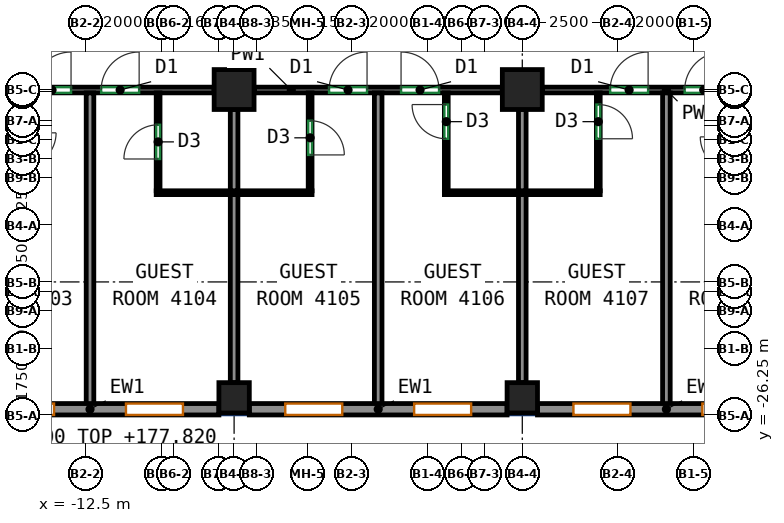
"""IFC4 building model, lengths in metres.
Left out: names, types, materials, properties, quantities, classifications, styles, units other than length and angle.
Written with IfcOpenShell. Run it as: python <this file> out.ifc"""

import sys

from ifc_helpers import new_model, si_unit, direction, frame, frame_2d, origin, origin_2d, place, context, subcontext, project, spatial, rectangle, extrude, source, transform, mapped, element, fill, save


model = new_model("IFC4")
c1 = context("Model", 3, precision=1e-05, world=origin(), true_north=direction((0.0, 1.0)))
c2 = subcontext(c1, "Body", "Model", "MODEL_VIEW")
j1 = project(units=[si_unit("LENGTHUNIT", "METRE"), si_unit("PLANEANGLEUNIT", "RADIAN")], contexts=[c1])
p1 = place(None, origin())
s1 = spatial("IfcSite", under=j1, at=p1, CompositionType="ELEMENT")
p2 = place(p1, origin())
s2 = spatial("IfcBuilding", under=s1, at=p2, CompositionType="ELEMENT")
p3 = place(p2, frame((0.0, 0.0, 175.3)))
s3 = spatial("IfcBuildingStorey", under=s2, at=p3, CompositionType="ELEMENT", Elevation=175.3)
m1 = source(origin(), c2, "Body", "SweptSolid", [
    extrude(rectangle(XDim=0.8, YDim=0.8, at=origin_2d()), origin(), (0.0, 0.0, 1.0), 3.12),
])
p4 = place(p3, frame((-8.583, -25.8, 0.0), z_axis=(0.0, 0.0, 1.0), x_axis=(1.0, 0.0, 0.0)))
e1 = element("IfcColumn", 1, at=p4, inside=s3, PredefinedType="COLUMN", context=c2, shape_type="MappedRepresentation", body=[
    mapped(m1, transform((0.0, 0.0, 0.0))),
])
m2 = source(origin(), c2, "Body", "SweptSolid", [
    extrude(rectangle(XDim=1.05, YDim=1.05, at=origin_2d()), origin(), (0.0, 0.0, 1.0), 3.12),
])
p5 = place(p3, frame((-8.583, -17.688, 0.0), z_axis=(0.0, 0.0, 1.0), x_axis=(1.0, 0.0, 0.0)))
e2 = element("IfcColumn", 2, at=p5, inside=s3, PredefinedType="COLUMN", context=c2, shape_type="MappedRepresentation", body=[
    mapped(m2, transform((0.0, 0.0, 0.0))),
])
p6 = place(p3, frame((-1.0, -25.8, 0.0), z_axis=(0.0, 0.0, 1.0), x_axis=(1.0, 0.0, 0.0)))
e3 = element("IfcColumn", 3, at=p6, inside=s3, PredefinedType="COLUMN", context=c2, shape_type="MappedRepresentation", body=[
    mapped(m1, transform((0.0, 0.0, 0.0))),
])
p7 = place(p3, frame((-1.0, -17.688, 0.0), z_axis=(0.0, 0.0, 1.0), x_axis=(1.0, 0.0, 0.0)))
e4 = element("IfcColumn", 4, at=p7, inside=s3, PredefinedType="COLUMN", context=c2, shape_type="MappedRepresentation", body=[
    mapped(m2, transform((0.0, 0.0, 0.0))),
])
m3 = source(origin(), c2, "Body", "SweptSolid", [
    extrude(rectangle(XDim=6.783, YDim=0.3, at=frame_2d((3.392, 0.0))), origin(), (0.0, 0.0, 1.0), 3.12),
])
p8 = place(p3, frame((-15.767, -26.1, 0.0), z_axis=(0.0, 0.0, 1.0), x_axis=(1.0, 0.0, 0.0)))
e5 = element("IfcWall", 5, at=p8, inside=s3, PredefinedType="SOLIDWALL", context=c2, shape_type="MappedRepresentation", body=[
    mapped(m3, transform((0.0, 0.0, 0.0))),
])
p9 = place(p8, frame((0.946, 0.0, 0.85)))
e6 = element("IfcOpeningElement", 6, at=p9, cuts=e5, PredefinedType="OPENING", context=c2, shape_type="SweptSolid", body=[
    extrude(rectangle(XDim=1.5, YDim=1.95, at=frame_2d((0.75, 0.975))), frame((0.0, 0.16, 0.0), z_axis=(0.0, -1.0, 0.0), x_axis=(1.0, 0.0, 0.0)), (0.0, 0.0, 1.0), 0.32),
])
p10 = place(p8, frame((4.338, 0.0, 0.85)))
e7 = element("IfcOpeningElement", 7, at=p10, cuts=e5, PredefinedType="OPENING", context=c2, shape_type="SweptSolid", body=[
    extrude(rectangle(XDim=1.5, YDim=1.95, at=frame_2d((0.75, 0.975))), frame((0.0, 0.16, 0.0), z_axis=(0.0, -1.0, 0.0), x_axis=(1.0, 0.0, 0.0)), (0.0, 0.0, 1.0), 0.32),
])
m4 = source(origin(), c2, "Body", "SweptSolid", [
    extrude(rectangle(XDim=6.783, YDim=0.3, at=frame_2d((3.392, 0.0))), origin(), (0.0, 0.0, 1.0), 3.12),
])
p11 = place(p3, frame((-8.183, -26.1, 0.0), z_axis=(0.0, 0.0, 1.0), x_axis=(1.0, 0.0, 0.0)))
e8 = element("IfcWall", 8, at=p11, inside=s3, PredefinedType="SOLIDWALL", context=c2, shape_type="MappedRepresentation", body=[
    mapped(m4, transform((0.0, 0.0, 0.0))),
])
p12 = place(p11, frame((0.946, 0.0, 0.85)))
e9 = element("IfcOpeningElement", 9, at=p12, cuts=e8, PredefinedType="OPENING", context=c2, shape_type="SweptSolid", body=[
    extrude(rectangle(XDim=1.5, YDim=1.95, at=frame_2d((0.75, 0.975))), frame((0.0, 0.16, 0.0), z_axis=(0.0, -1.0, 0.0), x_axis=(1.0, 0.0, 0.0)), (0.0, 0.0, 1.0), 0.32),
])
p13 = place(p11, frame((4.337, 0.0, 0.85)))
e10 = element("IfcOpeningElement", 10, at=p13, cuts=e8, PredefinedType="OPENING", context=c2, shape_type="SweptSolid", body=[
    extrude(rectangle(XDim=1.5, YDim=1.95, at=frame_2d((0.75, 0.975))), frame((0.0, 0.16, 0.0), z_axis=(0.0, -1.0, 0.0), x_axis=(1.0, 0.0, 0.0)), (0.0, 0.0, 1.0), 0.32),
])
p14 = place(p3, frame((-0.6, -26.1, 0.0), z_axis=(0.0, 0.0, 1.0), x_axis=(1.0, 0.0, 0.0)))
e11 = element("IfcWall", 11, at=p14, inside=s3, PredefinedType="SOLIDWALL", context=c2, shape_type="MappedRepresentation", body=[
    mapped(m4, transform((0.0, 0.0, 0.0))),
])
p15 = place(p14, frame((0.946, 0.0, 0.85)))
e12 = element("IfcOpeningElement", 12, at=p15, cuts=e11, PredefinedType="OPENING", context=c2, shape_type="SweptSolid", body=[
    extrude(rectangle(XDim=1.5, YDim=1.95, at=frame_2d((0.75, 0.975))), frame((0.0, 0.16, 0.0), z_axis=(0.0, -1.0, 0.0), x_axis=(1.0, 0.0, 0.0)), (0.0, 0.0, 1.0), 0.32),
])
p16 = place(p14, frame((4.337, 0.0, 0.85)))
e13 = element("IfcOpeningElement", 13, at=p16, cuts=e11, PredefinedType="OPENING", context=c2, shape_type="SweptSolid", body=[
    extrude(rectangle(XDim=1.5, YDim=1.95, at=frame_2d((0.75, 0.975))), frame((0.0, 0.16, 0.0), z_axis=(0.0, -1.0, 0.0), x_axis=(1.0, 0.0, 0.0)), (0.0, 0.0, 1.0), 0.32),
])
p17 = place(p3, frame((-15.642, -17.7, 0.0), z_axis=(0.0, 0.0, 1.0), x_axis=(1.0, 0.0, 0.0)))
e14 = element("IfcWall", 14, at=p17, inside=s3, PredefinedType="PARTITIONING", context=c2, shape_type="SweptSolid", body=[
    extrude(rectangle(XDim=6.534, YDim=0.15, at=frame_2d((3.267, 0.0))), origin(), (0.0, 0.0, 1.0), 3.12),
])
p18 = place(p17, frame((1.768, 0.0, 0.0)))
e15 = element("IfcOpeningElement", 15, at=p18, cuts=e14, PredefinedType="OPENING", context=c2, shape_type="SweptSolid", body=[
    extrude(rectangle(XDim=1.0, YDim=2.1, at=frame_2d((0.5, 1.05))), frame((0.0, 0.085, 0.0), z_axis=(0.0, -1.0, 0.0), x_axis=(1.0, 0.0, 0.0)), (0.0, 0.0, 1.0), 0.17),
])
p19 = place(p17, frame((3.56, 0.0, 0.0)))
e16 = element("IfcOpeningElement", 16, at=p19, cuts=e14, PredefinedType="OPENING", context=c2, shape_type="SweptSolid", body=[
    extrude(rectangle(XDim=1.0, YDim=2.1, at=frame_2d((0.5, 1.05))), frame((0.0, 0.085, 0.0), z_axis=(0.0, -1.0, 0.0), x_axis=(1.0, 0.0, 0.0)), (0.0, 0.0, 1.0), 0.17),
])
p20 = place(p3, frame((-8.058, -17.7, 0.0), z_axis=(0.0, 0.0, 1.0), x_axis=(1.0, 0.0, 0.0)))
e17 = element("IfcWall", 17, at=p20, inside=s3, PredefinedType="PARTITIONING", context=c2, shape_type="SweptSolid", body=[
    extrude(rectangle(XDim=6.533, YDim=0.15, at=frame_2d((3.267, 0.0))), origin(), (0.0, 0.0, 1.0), 3.12),
])
p21 = place(p20, frame((1.973, 0.0, 0.0)))
e18 = element("IfcOpeningElement", 18, at=p21, cuts=e17, PredefinedType="OPENING", context=c2, shape_type="SweptSolid", body=[
    extrude(rectangle(XDim=1.0, YDim=2.1, at=frame_2d((0.5, 1.05))), frame((0.0, 0.085, 0.0), z_axis=(0.0, -1.0, 0.0), x_axis=(1.0, 0.0, 0.0)), (0.0, 0.0, 1.0), 0.17),
])
p22 = place(p20, frame((3.868, 0.0, 0.0)))
e19 = element("IfcOpeningElement", 19, at=p22, cuts=e17, PredefinedType="OPENING", context=c2, shape_type="SweptSolid", body=[
    extrude(rectangle(XDim=1.0, YDim=2.1, at=frame_2d((0.5, 1.05))), frame((0.0, 0.085, 0.0), z_axis=(0.0, -1.0, 0.0), x_axis=(1.0, 0.0, 0.0)), (0.0, 0.0, 1.0), 0.17),
])
p23 = place(p3, frame((-0.475, -17.7, 0.0), z_axis=(0.0, 0.0, 1.0), x_axis=(1.0, 0.0, 0.0)))
e20 = element("IfcWall", 20, at=p23, inside=s3, PredefinedType="PARTITIONING", context=c2, shape_type="SweptSolid", body=[
    extrude(rectangle(XDim=6.533, YDim=0.15, at=frame_2d((3.267, 0.0))), origin(), (0.0, 0.0, 1.0), 3.12),
])
p24 = place(p23, frame((1.786, 0.0, 0.0)))
e21 = element("IfcOpeningElement", 21, at=p24, cuts=e20, PredefinedType="OPENING", context=c2, shape_type="SweptSolid", body=[
    extrude(rectangle(XDim=1.0, YDim=2.1, at=frame_2d((0.5, 1.05))), frame((0.0, 0.085, 0.0), z_axis=(0.0, -1.0, 0.0), x_axis=(1.0, 0.0, 0.0)), (0.0, 0.0, 1.0), 0.17),
])
p25 = place(p23, frame((3.748, 0.0, 0.0)))
e22 = element("IfcOpeningElement", 22, at=p25, cuts=e20, PredefinedType="OPENING", context=c2, shape_type="SweptSolid", body=[
    extrude(rectangle(XDim=1.0, YDim=2.1, at=frame_2d((0.5, 1.05))), frame((0.0, 0.085, 0.0), z_axis=(0.0, -1.0, 0.0), x_axis=(1.0, 0.0, 0.0)), (0.0, 0.0, 1.0), 0.17),
])
p26 = place(p3, frame((-12.375, -26.0, 0.0), z_axis=(0.0, 0.0, 1.0), x_axis=(0.0, 1.0, 0.0)))
e23 = element("IfcWall", 23, at=p26, inside=s3, PredefinedType="PARTITIONING", context=c2, shape_type="SweptSolid", body=[
    extrude(rectangle(XDim=8.223, YDim=0.2, at=frame_2d((4.111, 0.0))), origin(), (0.0, 0.0, 1.0), 3.12),
])
p27 = place(p3, frame((-10.583, -20.352, 0.0), z_axis=(0.0, 0.0, 1.0), x_axis=(0.0, 1.0, 0.0)))
e24 = element("IfcWall", 24, at=p27, inside=s3, PredefinedType="PARTITIONING", context=c2, shape_type="SweptSolid", body=[
    extrude(rectangle(XDim=2.575, YDim=0.1, at=frame_2d((1.288, 0.0))), origin(), (0.0, 0.0, 1.0), 3.12),
])
p28 = place(p27, frame((0.837, 0.0, 0.0)))
e25 = element("IfcOpeningElement", 25, at=p28, cuts=e24, PredefinedType="OPENING", context=c2, shape_type="SweptSolid", body=[
    extrude(rectangle(XDim=0.9, YDim=2.1, at=frame_2d((0.45, 1.05))), frame((0.0, 0.06, 0.0), z_axis=(0.0, -1.0, 0.0), x_axis=(1.0, 0.0, 0.0)), (0.0, 0.0, 1.0), 0.12),
])
p29 = place(p3, frame((-10.633, -20.402, 0.0), z_axis=(0.0, 0.0, 1.0), x_axis=(1.0, 0.0, 0.0)))
e26 = element("IfcWall", 26, at=p29, inside=s3, PredefinedType="PARTITIONING", context=c2, shape_type="SweptSolid", body=[
    extrude(rectangle(XDim=4.1, YDim=0.1, at=frame_2d((2.05, 0.0))), origin(), (0.0, 0.0, 1.0), 3.12),
])
p30 = place(p3, frame((-8.583, -25.4, 0.0), z_axis=(0.0, 0.0, 1.0), x_axis=(0.0, 1.0, 0.0)))
e27 = element("IfcWall", 27, at=p30, inside=s3, PredefinedType="PARTITIONING", context=c2, shape_type="SweptSolid", body=[
    extrude(rectangle(XDim=4.948, YDim=0.2, at=frame_2d((2.474, 0.0))), origin(), (0.0, 0.0, 1.0), 3.12),
])
p31 = place(p3, frame((-8.583, -20.352, 0.0), z_axis=(0.0, 0.0, 1.0), x_axis=(0.0, 1.0, 0.0)))
e28 = element("IfcWall", 28, at=p31, inside=s3, PredefinedType="PARTITIONING", context=c2, shape_type="SweptSolid", body=[
    extrude(rectangle(XDim=2.14, YDim=0.2, at=frame_2d((1.07, 0.0))), origin(), (0.0, 0.0, 1.0), 3.12),
])
p32 = place(p3, frame((-6.583, -17.777, 0.0), z_axis=(0.0, 0.0, 1.0), x_axis=(0.0, -1.0, 0.0)))
e29 = element("IfcWall", 29, at=p32, inside=s3, PredefinedType="PARTITIONING", context=c2, shape_type="SweptSolid", body=[
    extrude(rectangle(XDim=2.575, YDim=0.1, at=frame_2d((1.288, 0.0))), origin(), (0.0, 0.0, 1.0), 3.12),
])
p33 = place(p32, frame((0.731, 0.0, 0.0)))
e30 = element("IfcOpeningElement", 30, at=p33, cuts=e29, PredefinedType="OPENING", context=c2, shape_type="SweptSolid", body=[
    extrude(rectangle(XDim=0.9, YDim=2.1, at=frame_2d((0.45, 1.05))), frame((0.0, 0.06, 0.0), z_axis=(0.0, -1.0, 0.0), x_axis=(1.0, 0.0, 0.0)), (0.0, 0.0, 1.0), 0.12),
])
p34 = place(p3, frame((-4.792, -26.0, 0.0), z_axis=(0.0, 0.0, 1.0), x_axis=(0.0, 1.0, 0.0)))
e31 = element("IfcWall", 31, at=p34, inside=s3, PredefinedType="PARTITIONING", context=c2, shape_type="SweptSolid", body=[
    extrude(rectangle(XDim=8.223, YDim=0.2, at=frame_2d((4.111, 0.0))), origin(), (0.0, 0.0, 1.0), 3.12),
])
p35 = place(p3, frame((-3.0, -20.352, 0.0), z_axis=(0.0, 0.0, 1.0), x_axis=(0.0, 1.0, 0.0)))
e32 = element("IfcWall", 32, at=p35, inside=s3, PredefinedType="PARTITIONING", context=c2, shape_type="SweptSolid", body=[
    extrude(rectangle(XDim=2.575, YDim=0.1, at=frame_2d((1.288, 0.0))), origin(), (0.0, 0.0, 1.0), 3.12),
])
p36 = place(p35, frame((1.369, 0.0, 0.0)))
e33 = element("IfcOpeningElement", 33, at=p36, cuts=e32, PredefinedType="OPENING", context=c2, shape_type="SweptSolid", body=[
    extrude(rectangle(XDim=0.9, YDim=2.1, at=frame_2d((0.45, 1.05))), frame((0.0, 0.06, 0.0), z_axis=(0.0, -1.0, 0.0), x_axis=(1.0, 0.0, 0.0)), (0.0, 0.0, 1.0), 0.12),
])
p37 = place(p3, frame((-3.05, -20.402, 0.0), z_axis=(0.0, 0.0, 1.0), x_axis=(1.0, 0.0, 0.0)))
e34 = element("IfcWall", 34, at=p37, inside=s3, PredefinedType="PARTITIONING", context=c2, shape_type="SweptSolid", body=[
    extrude(rectangle(XDim=4.1, YDim=0.1, at=frame_2d((2.05, 0.0))), origin(), (0.0, 0.0, 1.0), 3.12),
])
p38 = place(p3, frame((-1.0, -25.4, 0.0), z_axis=(0.0, 0.0, 1.0), x_axis=(0.0, 1.0, 0.0)))
e35 = element("IfcWall", 35, at=p38, inside=s3, PredefinedType="PARTITIONING", context=c2, shape_type="SweptSolid", body=[
    extrude(rectangle(XDim=4.948, YDim=0.2, at=frame_2d((2.474, 0.0))), origin(), (0.0, 0.0, 1.0), 3.12),
])
p39 = place(p3, frame((-1.0, -20.352, 0.0), z_axis=(0.0, 0.0, 1.0), x_axis=(0.0, 1.0, 0.0)))
e36 = element("IfcWall", 36, at=p39, inside=s3, PredefinedType="PARTITIONING", context=c2, shape_type="SweptSolid", body=[
    extrude(rectangle(XDim=2.14, YDim=0.2, at=frame_2d((1.07, 0.0))), origin(), (0.0, 0.0, 1.0), 3.12),
])
p40 = place(p3, frame((1.0, -17.777, 0.0), z_axis=(0.0, 0.0, 1.0), x_axis=(0.0, -1.0, 0.0)))
e37 = element("IfcWall", 37, at=p40, inside=s3, PredefinedType="PARTITIONING", context=c2, shape_type="SweptSolid", body=[
    extrude(rectangle(XDim=2.575, YDim=0.1, at=frame_2d((1.288, 0.0))), origin(), (0.0, 0.0, 1.0), 3.12),
])
p41 = place(p40, frame((0.306, 0.0, 0.0)))
e38 = element("IfcOpeningElement", 38, at=p41, cuts=e37, PredefinedType="OPENING", context=c2, shape_type="SweptSolid", body=[
    extrude(rectangle(XDim=0.9, YDim=2.1, at=frame_2d((0.45, 1.05))), frame((0.0, 0.06, 0.0), z_axis=(0.0, -1.0, 0.0), x_axis=(1.0, 0.0, 0.0)), (0.0, 0.0, 1.0), 0.12),
])
p42 = place(p3, frame((2.792, -26.0, 0.0), z_axis=(0.0, 0.0, 1.0), x_axis=(0.0, 1.0, 0.0)))
e39 = element("IfcWall", 39, at=p42, inside=s3, PredefinedType="PARTITIONING", context=c2, shape_type="SweptSolid", body=[
    extrude(rectangle(XDim=8.223, YDim=0.2, at=frame_2d((4.111, 0.0))), origin(), (0.0, 0.0, 1.0), 3.12),
])
p43 = place(p9, origin())
e40 = element("IfcWindow", 40, at=p43, inside=s3, PartitioningType="SINGLE_PANEL", PredefinedType="WINDOW", context=c2, shape_type="SweptSolid", body=[
    extrude(rectangle(XDim=1.5, YDim=1.95, at=frame_2d((0.75, 0.975))), frame((0.0, 0.03, 0.0), z_axis=(0.0, -1.0, 0.0), x_axis=(1.0, 0.0, 0.0)), (0.0, 0.0, 1.0), 0.06),
])
fill(e6, e40)
p44 = place(p10, origin())
e41 = element("IfcWindow", 41, at=p44, inside=s3, PartitioningType="SINGLE_PANEL", PredefinedType="WINDOW", context=c2, shape_type="SweptSolid", body=[
    extrude(rectangle(XDim=1.5, YDim=1.95, at=frame_2d((0.75, 0.975))), frame((0.0, 0.03, 0.0), z_axis=(0.0, -1.0, 0.0), x_axis=(1.0, 0.0, 0.0)), (0.0, 0.0, 1.0), 0.06),
])
fill(e7, e41)
p45 = place(p12, origin())
e42 = element("IfcWindow", 42, at=p45, inside=s3, PartitioningType="SINGLE_PANEL", PredefinedType="WINDOW", context=c2, shape_type="SweptSolid", body=[
    extrude(rectangle(XDim=1.5, YDim=1.95, at=frame_2d((0.75, 0.975))), frame((0.0, 0.03, 0.0), z_axis=(0.0, -1.0, 0.0), x_axis=(1.0, 0.0, 0.0)), (0.0, 0.0, 1.0), 0.06),
])
fill(e9, e42)
p46 = place(p13, origin())
e43 = element("IfcWindow", 43, at=p46, inside=s3, PartitioningType="SINGLE_PANEL", PredefinedType="WINDOW", context=c2, shape_type="SweptSolid", body=[
    extrude(rectangle(XDim=1.5, YDim=1.95, at=frame_2d((0.75, 0.975))), frame((0.0, 0.03, 0.0), z_axis=(0.0, -1.0, 0.0), x_axis=(1.0, 0.0, 0.0)), (0.0, 0.0, 1.0), 0.06),
])
fill(e10, e43)
p47 = place(p15, origin())
e44 = element("IfcWindow", 44, at=p47, inside=s3, PartitioningType="SINGLE_PANEL", PredefinedType="WINDOW", context=c2, shape_type="SweptSolid", body=[
    extrude(rectangle(XDim=1.5, YDim=1.95, at=frame_2d((0.75, 0.975))), frame((0.0, 0.03, 0.0), z_axis=(0.0, -1.0, 0.0), x_axis=(1.0, 0.0, 0.0)), (0.0, 0.0, 1.0), 0.06),
])
fill(e12, e44)
p48 = place(p16, origin())
e45 = element("IfcWindow", 45, at=p48, inside=s3, PartitioningType="SINGLE_PANEL", PredefinedType="WINDOW", context=c2, shape_type="SweptSolid", body=[
    extrude(rectangle(XDim=1.5, YDim=1.95, at=frame_2d((0.75, 0.975))), frame((0.0, 0.03, 0.0), z_axis=(0.0, -1.0, 0.0), x_axis=(1.0, 0.0, 0.0)), (0.0, 0.0, 1.0), 0.06),
])
fill(e13, e45)
p49 = place(p28, origin())
e46 = element("IfcDoor", 46, at=p49, inside=s3, OperationType="SINGLE_SWING_LEFT", PredefinedType="DOOR", context=c2, shape_type="SweptSolid", body=[
    extrude(rectangle(XDim=0.9, YDim=2.1, at=frame_2d((0.45, 1.05))), frame((0.0, 0.025, 0.0), z_axis=(0.0, -1.0, 0.0), x_axis=(1.0, 0.0, 0.0)), (0.0, 0.0, 1.0), 0.05),
])
fill(e25, e46)
p50 = place(p33, origin())
e47 = element("IfcDoor", 47, at=p50, inside=s3, OperationType="SINGLE_SWING_RIGHT", PredefinedType="DOOR", context=c2, shape_type="SweptSolid", body=[
    extrude(rectangle(XDim=0.9, YDim=2.1, at=frame_2d((0.45, 1.05))), frame((0.0, 0.025, 0.0), z_axis=(0.0, -1.0, 0.0), x_axis=(1.0, 0.0, 0.0)), (0.0, 0.0, 1.0), 0.05),
])
fill(e30, e47)
p51 = place(p36, origin())
e48 = element("IfcDoor", 48, at=p51, inside=s3, OperationType="SINGLE_SWING_RIGHT", PredefinedType="DOOR", context=c2, shape_type="SweptSolid", body=[
    extrude(rectangle(XDim=0.9, YDim=2.1, at=frame_2d((0.45, 1.05))), frame((0.0, 0.025, 0.0), z_axis=(0.0, -1.0, 0.0), x_axis=(1.0, 0.0, 0.0)), (0.0, 0.0, 1.0), 0.05),
])
fill(e33, e48)
p52 = place(p41, origin())
e49 = element("IfcDoor", 49, at=p52, inside=s3, OperationType="SINGLE_SWING_RIGHT", PredefinedType="DOOR", context=c2, shape_type="SweptSolid", body=[
    extrude(rectangle(XDim=0.9, YDim=2.1, at=frame_2d((0.45, 1.05))), frame((0.0, 0.025, 0.0), z_axis=(0.0, -1.0, 0.0), x_axis=(1.0, 0.0, 0.0)), (0.0, 0.0, 1.0), 0.05),
])
fill(e38, e49)
p53 = place(p18, origin())
e50 = element("IfcDoor", 50, at=p53, inside=s3, OperationType="SINGLE_SWING_RIGHT", PredefinedType="DOOR", context=c2, shape_type="SweptSolid", body=[
    extrude(rectangle(XDim=1.0, YDim=2.1, at=frame_2d((0.5, 1.05))), frame((0.0, 0.025, 0.0), z_axis=(0.0, -1.0, 0.0), x_axis=(1.0, 0.0, 0.0)), (0.0, 0.0, 1.0), 0.05),
])
fill(e15, e50)
p54 = place(p19, origin())
e51 = element("IfcDoor", 51, at=p54, inside=s3, OperationType="SINGLE_SWING_RIGHT", PredefinedType="DOOR", context=c2, shape_type="SweptSolid", body=[
    extrude(rectangle(XDim=1.0, YDim=2.1, at=frame_2d((0.5, 1.05))), frame((0.0, 0.025, 0.0), z_axis=(0.0, -1.0, 0.0), x_axis=(1.0, 0.0, 0.0)), (0.0, 0.0, 1.0), 0.05),
])
fill(e16, e51)
p55 = place(p21, origin())
e52 = element("IfcDoor", 52, at=p55, inside=s3, OperationType="SINGLE_SWING_RIGHT", PredefinedType="DOOR", context=c2, shape_type="SweptSolid", body=[
    extrude(rectangle(XDim=1.0, YDim=2.1, at=frame_2d((0.5, 1.05))), frame((0.0, 0.025, 0.0), z_axis=(0.0, -1.0, 0.0), x_axis=(1.0, 0.0, 0.0)), (0.0, 0.0, 1.0), 0.05),
])
fill(e18, e52)
p56 = place(p22, origin())
e53 = element("IfcDoor", 53, at=p56, inside=s3, OperationType="SINGLE_SWING_LEFT", PredefinedType="DOOR", context=c2, shape_type="SweptSolid", body=[
    extrude(rectangle(XDim=1.0, YDim=2.1, at=frame_2d((0.5, 1.05))), frame((0.0, 0.025, 0.0), z_axis=(0.0, -1.0, 0.0), x_axis=(1.0, 0.0, 0.0)), (0.0, 0.0, 1.0), 0.05),
])
fill(e19, e53)
p57 = place(p24, origin())
e54 = element("IfcDoor", 54, at=p57, inside=s3, OperationType="SINGLE_SWING_RIGHT", PredefinedType="DOOR", context=c2, shape_type="SweptSolid", body=[
    extrude(rectangle(XDim=1.0, YDim=2.1, at=frame_2d((0.5, 1.05))), frame((0.0, 0.025, 0.0), z_axis=(0.0, -1.0, 0.0), x_axis=(1.0, 0.0, 0.0)), (0.0, 0.0, 1.0), 0.05),
])
fill(e21, e54)
p58 = place(p25, origin())
e55 = element("IfcDoor", 55, at=p58, inside=s3, OperationType="SINGLE_SWING_RIGHT", PredefinedType="DOOR", context=c2, shape_type="SweptSolid", body=[
    extrude(rectangle(XDim=1.0, YDim=2.1, at=frame_2d((0.5, 1.05))), frame((0.0, 0.025, 0.0), z_axis=(0.0, -1.0, 0.0), x_axis=(1.0, 0.0, 0.0)), (0.0, 0.0, 1.0), 0.05),
])
fill(e22, e55)
save(model, sys.argv[1])
